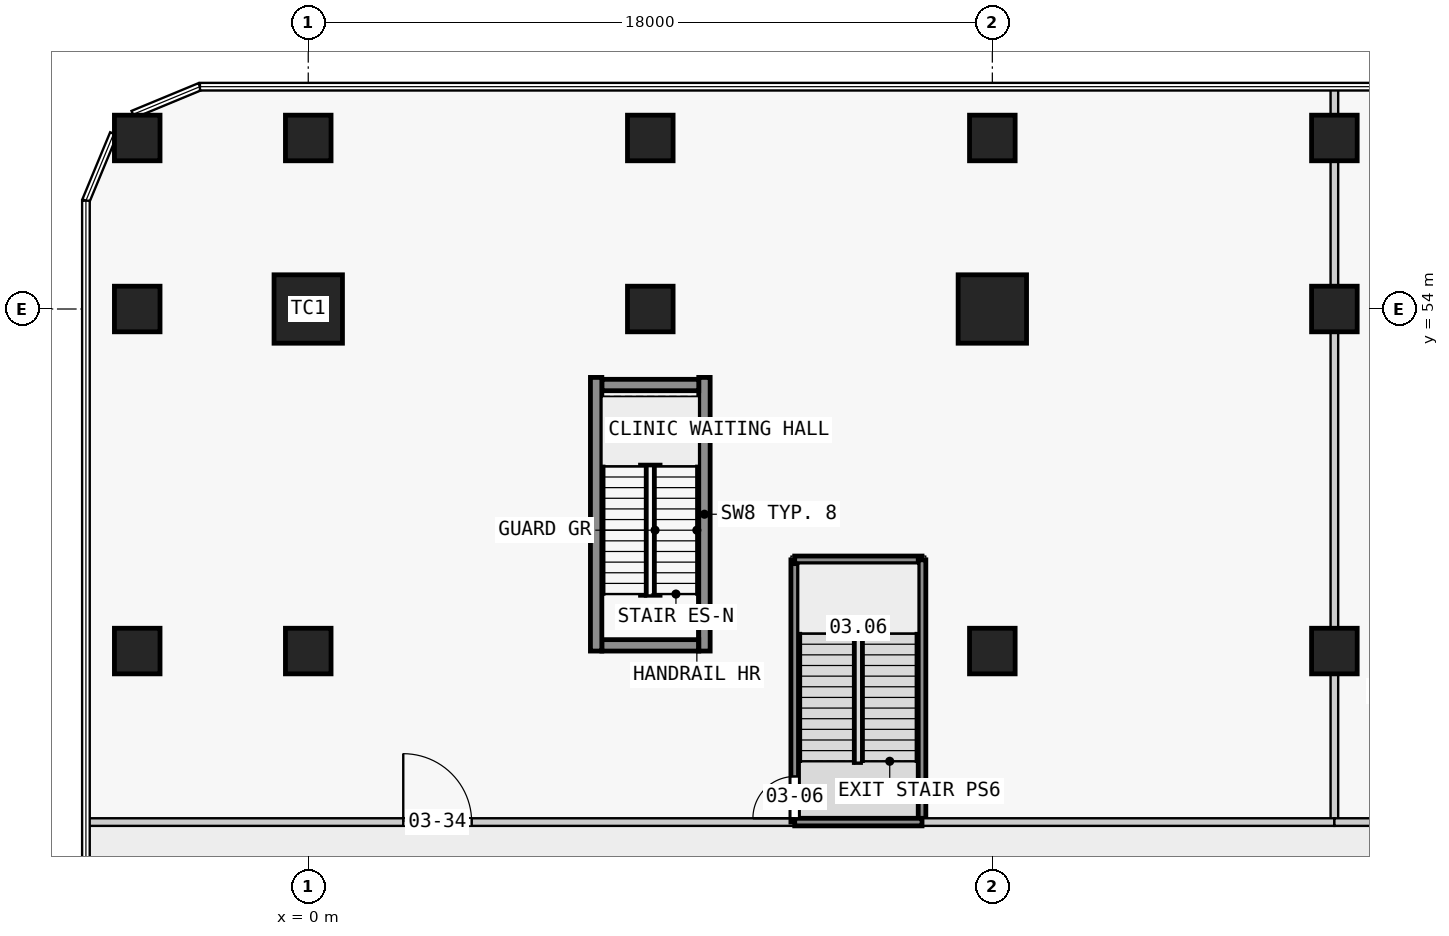
"""IFC4 building model, lengths in metres.
Left out: names, types, materials, properties, quantities, classifications, styles, units other than length and angle.
Written with IfcOpenShell. Run it as: python <this file> out.ifc"""

import sys

from ifc_helpers import new_model, si_unit, direction, frame, frame_2d, origin, origin_2d, place, context, subcontext, project, spatial, rectangle, extrude, element, fill, save


model = new_model("IFC4")
c1 = context("Model", 3, precision=1e-05, world=origin(), true_north=direction((0.0, 1.0)))
c2 = subcontext(c1, "Body", "Model", "MODEL_VIEW")
j1 = project(units=[si_unit("LENGTHUNIT", "METRE"), si_unit("PLANEANGLEUNIT", "RADIAN")], contexts=[c1])
p1 = place(None, origin())
s1 = spatial("IfcSite", under=j1, at=p1, CompositionType="ELEMENT")
p2 = place(p1, origin())
s2 = spatial("IfcBuilding", under=s1, at=p2, CompositionType="ELEMENT")
p3 = place(p2, frame((0.0, 0.0, 17.3)))
s3 = spatial("IfcBuildingStorey", under=s2, at=p3, CompositionType="ELEMENT", Elevation=17.3)
for number, where, z_axis, x_axis in (
    (1, (-4.5, 45.0, 0.0), (0.0, 0.0, 1.0), (1.0, 0.0, 0.0)),
    (2, (-4.5, 54.0, 0.0), (0.0, 0.0, 1.0), (1.0, 0.0, 0.0)),
    (3, (-4.5, 58.5, 0.0), (0.0, 0.0, 1.0), (1.0, 0.0, 0.0)),
    (4, (0.0, 45.0, 0.0), (0.0, 0.0, 1.0), (1.0, 0.0, 0.0)),
):
    element("IfcColumn", number, at=place(p3, frame(where, z_axis=z_axis, x_axis=x_axis)), inside=s3, PredefinedType="COLUMN", context=c2, shape_type="SweptSolid", body=[
        extrude(rectangle(XDim=1.2, YDim=1.2, at=origin_2d()), origin(), (0.0, 0.0, 1.0), 4.5),
    ])
p4 = place(p3, frame((0.0, 54.0, 0.0), z_axis=(0.0, 0.0, 1.0), x_axis=(1.0, 0.0, 0.0)))
e5 = element("IfcColumn", 5, at=p4, inside=s3, PredefinedType="COLUMN", context=c2, shape_type="SweptSolid", body=[
    extrude(rectangle(XDim=1.8, YDim=1.8, at=origin_2d()), origin(), (0.0, 0.0, 1.0), 4.5),
])
for number, where, z_axis, x_axis in (
    (6, (0.0, 58.5, 0.0), (0.0, 0.0, 1.0), (1.0, 0.0, 0.0)),
    (7, (9.0, 54.0, 0.0), (0.0, 0.0, 1.0), (1.0, 0.0, 0.0)),
    (8, (9.0, 58.5, 0.0), (0.0, 0.0, 1.0), (1.0, 0.0, 0.0)),
    (9, (18.0, 45.0, 0.0), (0.0, 0.0, 1.0), (1.0, 0.0, 0.0)),
):
    element("IfcColumn", number, at=place(p3, frame(where, z_axis=z_axis, x_axis=x_axis)), inside=s3, PredefinedType="COLUMN", context=c2, shape_type="SweptSolid", body=[
        extrude(rectangle(XDim=1.2, YDim=1.2, at=origin_2d()), origin(), (0.0, 0.0, 1.0), 4.5),
    ])
p5 = place(p3, frame((18.0, 54.0, 0.0), z_axis=(0.0, 0.0, 1.0), x_axis=(1.0, 0.0, 0.0)))
e10 = element("IfcColumn", 10, at=p5, inside=s3, PredefinedType="COLUMN", context=c2, shape_type="SweptSolid", body=[
    extrude(rectangle(XDim=1.8, YDim=1.8, at=origin_2d()), origin(), (0.0, 0.0, 1.0), 4.5),
])
for number, where, z_axis, x_axis in (
    (11, (18.0, 58.5, 0.0), (0.0, 0.0, 1.0), (1.0, 0.0, 0.0)),
    (12, (27.0, 45.0, 0.0), (0.0, 0.0, 1.0), (1.0, 0.0, 0.0)),
    (13, (27.0, 54.0, 0.0), (0.0, 0.0, 1.0), (1.0, 0.0, 0.0)),
    (14, (27.0, 58.5, 0.0), (0.0, 0.0, 1.0), (1.0, 0.0, 0.0)),
):
    element("IfcColumn", number, at=place(p3, frame(where, z_axis=z_axis, x_axis=x_axis)), inside=s3, PredefinedType="COLUMN", context=c2, shape_type="SweptSolid", body=[
        extrude(rectangle(XDim=1.2, YDim=1.2, at=origin_2d()), origin(), (0.0, 0.0, 1.0), 4.5),
    ])
for number, where, z_axis, x_axis in (
    (15, (7.725, 45.15, 0.0), (0.0, 0.0, 1.0), (1.0, 0.0, 0.0)),
    (16, (7.725, 52.0, 0.0), (0.0, 0.0, 1.0), (1.0, 0.0, 0.0)),
):
    element("IfcWall", number, at=place(p3, frame(where, z_axis=z_axis, x_axis=x_axis)), inside=s3, PredefinedType="SHEAR", context=c2, shape_type="SweptSolid", body=[
        extrude(rectangle(XDim=2.55, YDim=0.3, at=frame_2d((1.275, 0.0))), origin(), (0.0, 0.0, 1.0), 4.5),
    ])
for number, where, z_axis, x_axis in (
    (17, (7.575, 45.0, 0.0), (0.0, 0.0, 1.0), (0.0, 1.0, 0.0)),
    (18, (10.425, 45.0, 0.0), (0.0, 0.0, 1.0), (0.0, 1.0, 0.0)),
):
    element("IfcWall", number, at=place(p3, frame(where, z_axis=z_axis, x_axis=x_axis)), inside=s3, PredefinedType="SHEAR", context=c2, shape_type="SweptSolid", body=[
        extrude(rectangle(XDim=7.2, YDim=0.3, at=frame_2d((3.6, 0.0))), origin(), (0.0, 0.0, 1.0), 4.5),
    ])
p6 = place(p3, frame((27.0, 59.85, 0.0), z_axis=(0.0, 0.0, 1.0), x_axis=(0.0, -1.0, 0.0)))
e19 = element("IfcWall", 19, at=p6, inside=s3, PredefinedType="PARTITIONING", context=c2, shape_type="SweptSolid", body=[
    extrude(rectangle(XDim=0.75, YDim=0.2, at=frame_2d((0.375, 0.0))), origin(), (0.0, 0.0, 1.0), 4.15),
])
p7 = place(p3, frame((27.0, 57.9, 0.0), z_axis=(0.0, 0.0, 1.0), x_axis=(0.0, -1.0, 0.0)))
e20 = element("IfcWall", 20, at=p7, inside=s3, PredefinedType="PARTITIONING", context=c2, shape_type="SweptSolid", body=[
    extrude(rectangle(XDim=3.3, YDim=0.2, at=frame_2d((1.65, 0.0))), origin(), (0.0, 0.0, 1.0), 4.15),
])
p8 = place(p3, frame((27.0, 53.4, 0.0), z_axis=(0.0, 0.0, 1.0), x_axis=(0.0, -1.0, 0.0)))
e21 = element("IfcWall", 21, at=p8, inside=s3, PredefinedType="PARTITIONING", context=c2, shape_type="SweptSolid", body=[
    extrude(rectangle(XDim=7.8, YDim=0.2, at=frame_2d((3.9, 0.0))), origin(), (0.0, 0.0, 1.0), 4.15),
])
p9 = place(p3, frame((27.0, 44.4, 0.0), z_axis=(0.0, 0.0, 1.0), x_axis=(0.0, -1.0, 0.0)))
e22 = element("IfcWall", 22, at=p9, inside=s3, PredefinedType="PARTITIONING", context=c2, shape_type="SweptSolid", body=[
    extrude(rectangle(XDim=3.9, YDim=0.2, at=frame_2d((1.95, 0.0))), origin(), (0.0, 0.0, 1.0), 4.15),
])
p10 = place(p3, frame((-5.85, 40.5, 0.0), z_axis=(0.0, 0.0, 1.0), x_axis=(1.0, 0.0, 0.0)))
e23 = element("IfcWall", 23, at=p10, inside=s3, PredefinedType="PARTITIONING", context=c2, shape_type="SweptSolid", body=[
    extrude(rectangle(XDim=18.65, YDim=0.2, at=frame_2d((9.325, 0.0))), origin(), (0.0, 0.0, 1.0), 4.15),
])
p11 = place(p10, frame((8.35, 0.0, 0.0)))
e24 = element("IfcOpeningElement", 24, at=p11, cuts=e23, PredefinedType="OPENING", context=c2, shape_type="SweptSolid", body=[
    extrude(rectangle(XDim=1.8, YDim=2.1, at=frame_2d((0.9, 1.05))), frame((0.0, 0.11, 0.0), z_axis=(0.0, -1.0, 0.0), x_axis=(1.0, 0.0, 0.0)), (0.0, 0.0, 1.0), 0.22),
])
p12 = place(p3, frame((12.8, 40.5, 0.0), z_axis=(0.0, 0.0, 1.0), x_axis=(0.0, 1.0, 0.0)))
e25 = element("IfcWall", 25, at=p12, inside=s3, PredefinedType="PARTITIONING", context=c2, shape_type="SweptSolid", body=[
    extrude(rectangle(XDim=6.9, YDim=0.2, at=frame_2d((3.45, 0.0))), origin(), (0.0, 0.0, 1.0), 4.15),
])
p13 = place(p12, frame((0.1, 0.0, 0.0)))
e26 = element("IfcOpeningElement", 26, at=p13, cuts=e25, PredefinedType="OPENING", context=c2, shape_type="SweptSolid", body=[
    extrude(rectangle(XDim=1.1, YDim=2.1, at=frame_2d((0.55, 1.05))), frame((0.0, 0.11, 0.0), z_axis=(0.0, -1.0, 0.0), x_axis=(1.0, 0.0, 0.0)), (0.0, 0.0, 1.0), 0.22),
])
p14 = place(p3, frame((12.8, 47.4, 0.0), z_axis=(0.0, 0.0, 1.0), x_axis=(1.0, 0.0, 0.0)))
e27 = element("IfcWall", 27, at=p14, inside=s3, PredefinedType="PARTITIONING", context=c2, shape_type="SweptSolid", body=[
    extrude(rectangle(XDim=3.35, YDim=0.2, at=frame_2d((1.675, 0.0))), origin(), (0.0, 0.0, 1.0), 4.15),
])
p15 = place(p3, frame((16.15, 47.4, 0.0), z_axis=(0.0, 0.0, 1.0), x_axis=(0.0, -1.0, 0.0)))
e28 = element("IfcWall", 28, at=p15, inside=s3, PredefinedType="PARTITIONING", context=c2, shape_type="SweptSolid", body=[
    extrude(rectangle(XDim=6.9, YDim=0.2, at=frame_2d((3.45, 0.0))), origin(), (0.0, 0.0, 1.0), 4.15),
])
p16 = place(p3, frame((16.15, 40.5, 0.0), z_axis=(0.0, 0.0, 1.0), x_axis=(1.0, 0.0, 0.0)))
e29 = element("IfcWall", 29, at=p16, inside=s3, PredefinedType="PARTITIONING", context=c2, shape_type="SweptSolid", body=[
    extrude(rectangle(XDim=10.85, YDim=0.2, at=frame_2d((5.425, 0.0))), origin(), (0.0, 0.0, 1.0), 4.15),
])
p17 = place(p3, frame((27.0, 40.5, 0.0), z_axis=(0.0, 0.0, 1.0), x_axis=(1.0, 0.0, 0.0)))
e30 = element("IfcWall", 30, at=p17, inside=s3, PredefinedType="PARTITIONING", context=c2, shape_type="SweptSolid", body=[
    extrude(rectangle(XDim=3.6, YDim=0.2, at=frame_2d((1.8, 0.0))), origin(), (0.0, 0.0, 1.0), 4.15),
])
p18 = place(p3, frame((16.15, 40.5, 0.0), z_axis=(0.0, 0.0, 1.0), x_axis=(-1.0, 0.0, 0.0)))
e31 = element("IfcWall", 31, at=p18, inside=s3, PredefinedType="PARTITIONING", context=c2, shape_type="SweptSolid", body=[
    extrude(rectangle(XDim=3.35, YDim=0.2, at=frame_2d((1.675, 0.0))), origin(), (0.0, 0.0, 1.0), 4.15),
])
p19 = place(p13, origin())
e32 = element("IfcDoor", 32, at=p19, inside=s3, OperationType="SINGLE_SWING_LEFT", PredefinedType="DOOR", context=c2, shape_type="SweptSolid", body=[
    extrude(rectangle(XDim=1.1, YDim=2.1, at=frame_2d((0.55, 1.05))), frame((0.0, 0.025, 0.0), z_axis=(0.0, -1.0, 0.0), x_axis=(1.0, 0.0, 0.0)), (0.0, 0.0, 1.0), 0.05),
])
fill(e26, e32)
p20 = place(p11, origin())
e33 = element("IfcDoor", 33, at=p20, inside=s3, OperationType="DOUBLE_DOOR_SINGLE_SWING", PredefinedType="DOOR", context=c2, shape_type="SweptSolid", body=[
    extrude(rectangle(XDim=1.8, YDim=2.1, at=frame_2d((0.9, 1.05))), frame((0.0, 0.025, 0.0), z_axis=(0.0, -1.0, 0.0), x_axis=(1.0, 0.0, 0.0)), (0.0, 0.0, 1.0), 0.05),
])
fill(e24, e33)
save(model, sys.argv[1])
